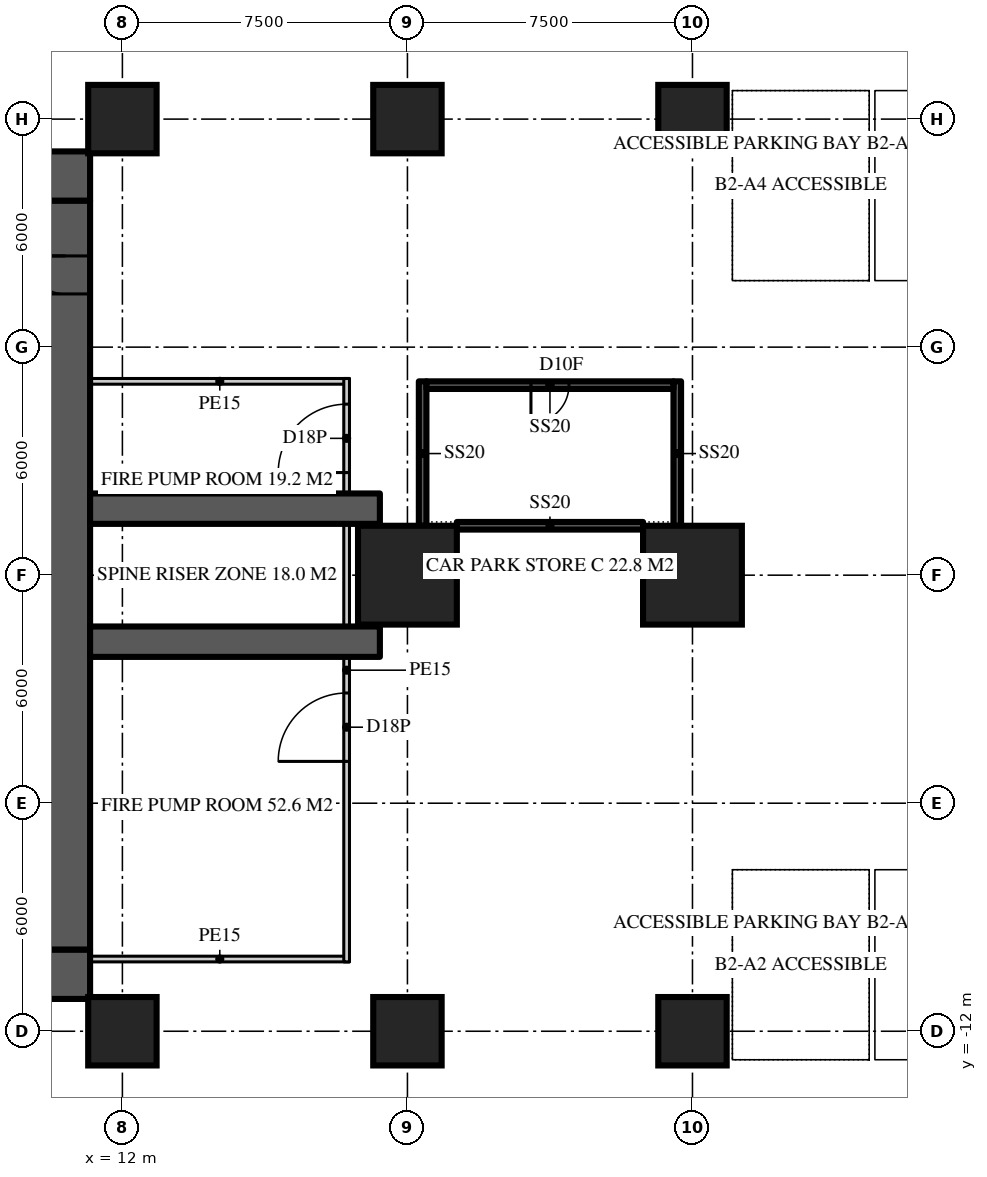
"""IFC4 building model, lengths in metres.
Left out: names, types, materials, properties, quantities, classifications, styles, units other than length and angle.
Written with IfcOpenShell. Run it as: python <this file> out.ifc"""

import sys

from ifc_helpers import new_model, si_unit, direction, frame, frame_2d, origin, origin_2d, place, context, subcontext, project, spatial, rectangle, extrude, element, fill, save


model = new_model("IFC4")
c1 = context("Model", 3, precision=1e-05, world=origin(), true_north=direction((0.0, 1.0)))
c2 = subcontext(c1, "Body", "Model", "MODEL_VIEW")
j1 = project(units=[si_unit("LENGTHUNIT", "METRE"), si_unit("PLANEANGLEUNIT", "RADIAN")], contexts=[c1])
p1 = place(None, origin())
s1 = spatial("IfcSite", under=j1, at=p1, CompositionType="ELEMENT")
p2 = place(p1, origin())
s2 = spatial("IfcBuilding", under=s1, at=p2, CompositionType="ELEMENT")
p3 = place(p2, frame((0.0, 0.0, -10.0)))
s3 = spatial("IfcBuildingStorey", under=s2, at=p3, CompositionType="ELEMENT", Elevation=-10.0)
p4 = place(p3, frame((-11.15, 10.5, 0.0), z_axis=(0.0, 0.0, 1.0), x_axis=(1.0, 0.0, 0.0)))
e1 = element("IfcWall", 1, at=p4, inside=s3, PredefinedType="SHEAR", context=c2, shape_type="SweptSolid", body=[
    extrude(rectangle(XDim=22.3, YDim=1.3, at=frame_2d((11.15, 0.0))), origin(), (0.0, 0.0, 1.0), 5.0),
])
p5 = place(p4, frame((4.25, 0.0, 0.0)))
e2 = element("IfcOpeningElement", 2, at=p5, cuts=e1, PredefinedType="OPENING", context=c2, shape_type="SweptSolid", body=[
    extrude(rectangle(XDim=1.8, YDim=2.2, at=frame_2d((0.9, 1.1))), frame((0.0, 0.66, 0.0), z_axis=(0.0, -1.0, 0.0), x_axis=(1.0, 0.0, 0.0)), (0.0, 0.0, 1.0), 1.32),
])
p6 = place(p4, frame((16.25, 0.0, 0.0)))
e3 = element("IfcOpeningElement", 3, at=p6, cuts=e1, PredefinedType="OPENING", context=c2, shape_type="SweptSolid", body=[
    extrude(rectangle(XDim=1.8, YDim=2.2, at=frame_2d((0.9, 1.1))), frame((0.0, 0.66, 0.0), z_axis=(0.0, -1.0, 0.0), x_axis=(1.0, 0.0, 0.0)), (0.0, 0.0, 1.0), 1.32),
])
p7 = place(p3, frame((11.15, -10.5, 0.0), z_axis=(0.0, 0.0, 1.0), x_axis=(-1.0, 0.0, 0.0)))
e4 = element("IfcWall", 4, at=p7, inside=s3, PredefinedType="SHEAR", context=c2, shape_type="SweptSolid", body=[
    extrude(rectangle(XDim=22.3, YDim=1.3, at=frame_2d((11.15, 0.0))), origin(), (0.0, 0.0, 1.0), 5.0),
])
p8 = place(p7, frame((16.25, 0.0, 0.0)))
e5 = element("IfcOpeningElement", 5, at=p8, cuts=e4, PredefinedType="OPENING", context=c2, shape_type="SweptSolid", body=[
    extrude(rectangle(XDim=1.8, YDim=2.2, at=frame_2d((0.9, 1.1))), frame((0.0, 0.66, 0.0), z_axis=(0.0, -1.0, 0.0), x_axis=(1.0, 0.0, 0.0)), (0.0, 0.0, 1.0), 1.32),
])
p9 = place(p7, frame((4.25, 0.0, 0.0)))
e6 = element("IfcOpeningElement", 6, at=p9, cuts=e4, PredefinedType="OPENING", context=c2, shape_type="SweptSolid", body=[
    extrude(rectangle(XDim=1.8, YDim=2.2, at=frame_2d((0.9, 1.1))), frame((0.0, 0.66, 0.0), z_axis=(0.0, -1.0, 0.0), x_axis=(1.0, 0.0, 0.0)), (0.0, 0.0, 1.0), 1.32),
])
p10 = place(p3, frame((10.5, -9.85, 0.0), z_axis=(0.0, 0.0, 1.0), x_axis=(0.0, 1.0, 0.0)))
e7 = element("IfcWall", 7, at=p10, inside=s3, PredefinedType="SHEAR", context=c2, shape_type="SweptSolid", body=[
    extrude(rectangle(XDim=19.7, YDim=1.3, at=frame_2d((9.85, 0.0))), origin(), (0.0, 0.0, 1.0), 5.0),
])
p11 = place(p10, frame((17.25, 0.0, 0.0)))
e8 = element("IfcOpeningElement", 8, at=p11, cuts=e7, PredefinedType="OPENING", context=c2, shape_type="SweptSolid", body=[
    extrude(rectangle(XDim=1.0, YDim=2.2, at=frame_2d((0.5, 1.1))), frame((0.0, 0.66, 0.0), z_axis=(0.0, -1.0, 0.0), x_axis=(1.0, 0.0, 0.0)), (0.0, 0.0, 1.0), 1.32),
])
for number, where, z_axis, x_axis in (
    (9, (11.15, -1.75, 0.0), (0.0, 0.0, 1.0), (1.0, 0.0, 0.0)),
    (10, (11.15, 1.75, 0.0), (0.0, 0.0, 1.0), (1.0, 0.0, 0.0)),
):
    element("IfcWall", number, at=place(p3, frame(where, z_axis=z_axis, x_axis=x_axis)), inside=s3, PredefinedType="SHEAR", context=c2, shape_type="SweptSolid", body=[
        extrude(rectangle(XDim=7.625, YDim=0.8, at=frame_2d((3.812, 0.0))), origin(), (0.0, 0.0, 1.0), 5.0),
    ])
for number, where, z_axis, x_axis in (
    (11, (12.0, -12.0, 0.0), (0.0, 0.0, 1.0), (1.0, 0.0, 0.0)),
    (12, (19.5, -12.0, 0.0), (0.0, 0.0, 1.0), (1.0, 0.0, 0.0)),
    (13, (27.0, -12.0, 0.0), (0.0, 0.0, 1.0), (1.0, 0.0, 0.0)),
):
    element("IfcColumn", number, at=place(p3, frame(where, z_axis=z_axis, x_axis=x_axis)), inside=s3, PredefinedType="COLUMN", context=c2, shape_type="SweptSolid", body=[
        extrude(rectangle(XDim=1.8, YDim=1.8, at=origin_2d()), origin(), (0.0, 0.0, 1.0), 5.0),
    ])
for number, where, z_axis, x_axis in (
    (14, (19.5, 0.0, 0.0), (0.0, 0.0, 1.0), (1.0, 0.0, 0.0)),
    (15, (27.0, 0.0, 0.0), (0.0, 0.0, 1.0), (1.0, 0.0, 0.0)),
):
    element("IfcColumn", number, at=place(p3, frame(where, z_axis=z_axis, x_axis=x_axis)), inside=s3, PredefinedType="COLUMN", context=c2, shape_type="SweptSolid", body=[
        extrude(rectangle(XDim=2.6, YDim=2.6, at=origin_2d()), origin(), (0.0, 0.0, 1.0), 5.0),
    ])
for number, where, z_axis, x_axis in (
    (16, (12.0, 12.0, 0.0), (0.0, 0.0, 1.0), (1.0, 0.0, 0.0)),
    (17, (19.5, 12.0, 0.0), (0.0, 0.0, 1.0), (1.0, 0.0, 0.0)),
    (18, (27.0, 12.0, 0.0), (0.0, 0.0, 1.0), (1.0, 0.0, 0.0)),
):
    element("IfcColumn", number, at=place(p3, frame(where, z_axis=z_axis, x_axis=x_axis)), inside=s3, PredefinedType="COLUMN", context=c2, shape_type="SweptSolid", body=[
        extrude(rectangle(XDim=1.8, YDim=1.8, at=origin_2d()), origin(), (0.0, 0.0, 1.0), 5.0),
    ])
for number, where, z_axis, x_axis in (
    (19, (11.15, -10.1, 0.0), (0.0, 0.0, 1.0), (1.0, 0.0, 0.0)),
    (20, (11.15, 5.1, 0.0), (0.0, 0.0, 1.0), (1.0, 0.0, 0.0)),
):
    element("IfcWall", number, at=place(p3, frame(where, z_axis=z_axis, x_axis=x_axis)), inside=s3, PredefinedType="SOLIDWALL", context=c2, shape_type="SweptSolid", body=[
        extrude(rectangle(XDim=6.825, YDim=0.15, at=frame_2d((3.413, 0.0))), origin(), (0.0, 0.0, 1.0), 4.7),
    ])
p12 = place(p3, frame((17.9, -10.175, 0.0), z_axis=(0.0, 0.0, 1.0), x_axis=(0.0, 1.0, 0.0)))
e21 = element("IfcWall", 21, at=p12, inside=s3, PredefinedType="SOLIDWALL", context=c2, shape_type="SweptSolid", body=[
    extrude(rectangle(XDim=15.35, YDim=0.15, at=frame_2d((7.675, 0.0))), origin(), (0.0, 0.0, 1.0), 4.7),
])
p13 = place(p12, frame((5.275, 0.0, 0.0)))
e22 = element("IfcOpeningElement", 22, at=p13, cuts=e21, PredefinedType="OPENING", context=c2, shape_type="SweptSolid", body=[
    extrude(rectangle(XDim=1.8, YDim=2.4, at=frame_2d((0.9, 1.2))), frame((0.0, 0.085, 0.0), z_axis=(0.0, -1.0, 0.0), x_axis=(1.0, 0.0, 0.0)), (0.0, 0.0, 1.0), 0.17),
])
p14 = place(p12, frame((12.875, 0.0, 0.0)))
e23 = element("IfcOpeningElement", 23, at=p14, cuts=e21, PredefinedType="OPENING", context=c2, shape_type="SweptSolid", body=[
    extrude(rectangle(XDim=1.8, YDim=2.4, at=frame_2d((0.9, 1.2))), frame((0.0, 0.085, 0.0), z_axis=(0.0, -1.0, 0.0), x_axis=(1.0, 0.0, 0.0)), (0.0, 0.0, 1.0), 0.17),
])
for number, where, z_axis, x_axis in (
    (24, (19.9, 1.3, 0.0), (0.0, 0.0, 1.0), (0.0, 1.0, 0.0)),
    (25, (26.6, 5.1, 0.0), (0.0, 0.0, 1.0), (0.0, -1.0, 0.0)),
):
    element("IfcWall", number, at=place(p3, frame(where, z_axis=z_axis, x_axis=x_axis)), inside=s3, PredefinedType="SOLIDWALL", context=c2, shape_type="SweptSolid", body=[
        extrude(rectangle(XDim=3.8, YDim=0.2, at=frame_2d((1.9, 0.0))), origin(), (0.0, 0.0, 1.0), 4.7),
    ])
p15 = place(p3, frame((20.8, 1.3, 0.0), z_axis=(0.0, 0.0, 1.0), x_axis=(1.0, 0.0, 0.0)))
e26 = element("IfcWall", 26, at=p15, inside=s3, PredefinedType="SOLIDWALL", context=c2, shape_type="SweptSolid", body=[
    extrude(rectangle(XDim=4.9, YDim=0.2, at=frame_2d((2.45, 0.0))), origin(), (0.0, 0.0, 1.0), 4.7),
])
p16 = place(p3, frame((26.5, 5.0, 0.0), z_axis=(0.0, 0.0, 1.0), x_axis=(-1.0, 0.0, 0.0)))
e27 = element("IfcWall", 27, at=p16, inside=s3, PredefinedType="SOLIDWALL", context=c2, shape_type="SweptSolid", body=[
    extrude(rectangle(XDim=6.5, YDim=0.2, at=frame_2d((3.25, 0.0))), origin(), (0.0, 0.0, 1.0), 4.7),
])
p17 = place(p16, frame((2.75, 0.0, 0.0)))
e28 = element("IfcOpeningElement", 28, at=p17, cuts=e27, PredefinedType="OPENING", context=c2, shape_type="SweptSolid", body=[
    extrude(rectangle(XDim=1.0, YDim=2.2, at=frame_2d((0.5, 1.1))), frame((0.0, 0.11, 0.0), z_axis=(0.0, -1.0, 0.0), x_axis=(1.0, 0.0, 0.0)), (0.0, 0.0, 1.0), 0.22),
])
p18 = place(p11, origin())
e29 = element("IfcDoor", 29, at=p18, inside=s3, OperationType="SINGLE_SWING_RIGHT", PredefinedType="DOOR", context=c2, shape_type="SweptSolid", body=[
    extrude(rectangle(XDim=1.0, YDim=2.2, at=frame_2d((0.5, 1.1))), frame((0.0, 0.025, 0.0), z_axis=(0.0, -1.0, 0.0), x_axis=(1.0, 0.0, 0.0)), (0.0, 0.0, 1.0), 0.05),
])
fill(e8, e29)
p19 = place(p13, origin())
e30 = element("IfcDoor", 30, at=p19, inside=s3, OperationType="DOUBLE_DOOR_DOUBLE_SWING", PredefinedType="DOOR", context=c2, shape_type="SweptSolid", body=[
    extrude(rectangle(XDim=1.8, YDim=2.4, at=frame_2d((0.9, 1.2))), frame((0.0, 0.025, 0.0), z_axis=(0.0, -1.0, 0.0), x_axis=(1.0, 0.0, 0.0)), (0.0, 0.0, 1.0), 0.05),
])
fill(e22, e30)
p20 = place(p14, origin())
e31 = element("IfcDoor", 31, at=p20, inside=s3, OperationType="DOUBLE_DOOR_DOUBLE_SWING", PredefinedType="DOOR", context=c2, shape_type="SweptSolid", body=[
    extrude(rectangle(XDim=1.8, YDim=2.4, at=frame_2d((0.9, 1.2))), frame((0.0, 0.025, 0.0), z_axis=(0.0, -1.0, 0.0), x_axis=(1.0, 0.0, 0.0)), (0.0, 0.0, 1.0), 0.05),
])
fill(e23, e31)
p21 = place(p17, origin())
e32 = element("IfcDoor", 32, at=p21, inside=s3, OperationType="SINGLE_SWING_RIGHT", PredefinedType="DOOR", context=c2, shape_type="SweptSolid", body=[
    extrude(rectangle(XDim=1.0, YDim=2.2, at=frame_2d((0.5, 1.1))), frame((0.0, 0.025, 0.0), z_axis=(0.0, -1.0, 0.0), x_axis=(1.0, 0.0, 0.0)), (0.0, 0.0, 1.0), 0.05),
])
fill(e28, e32)
save(model, sys.argv[1])
